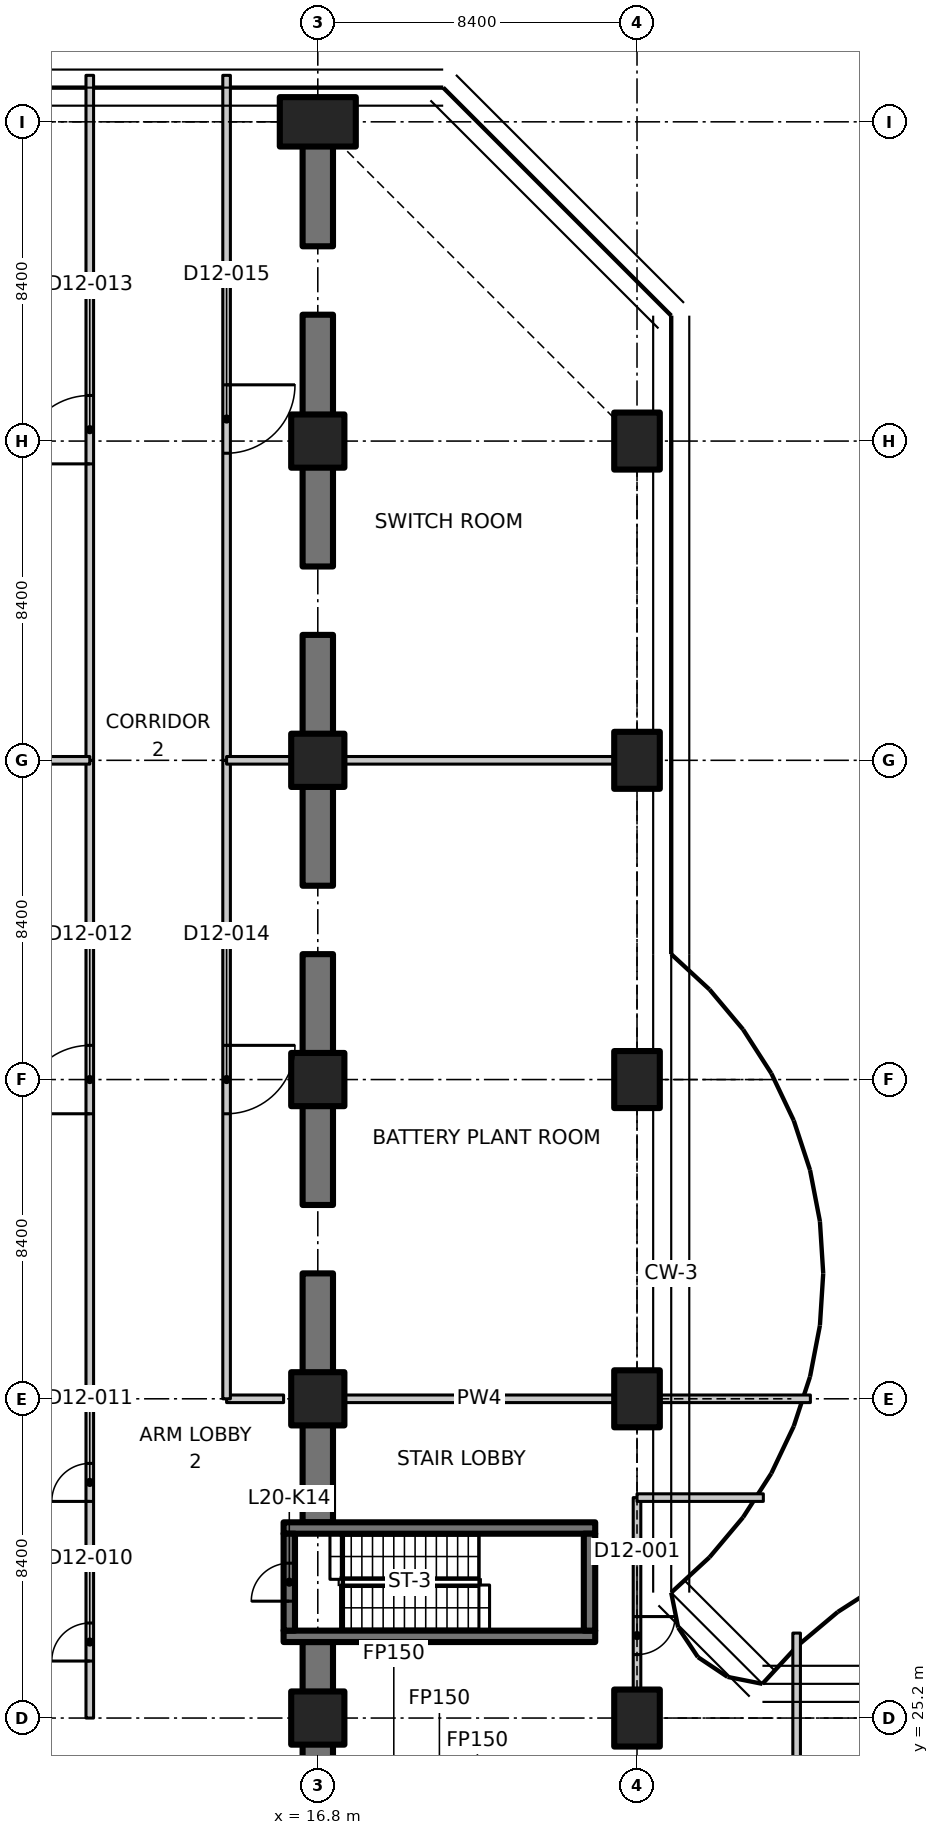
"""IFC4 building model, lengths in metres.
Left out: names, types, materials, properties, quantities, classifications, styles, units other than length and angle.
Written with IfcOpenShell. Run it as: python <this file> out.ifc"""

import sys

from ifc_helpers import new_model, si_unit, direction, frame, frame_2d, origin, origin_2d, place, context, subcontext, project, spatial, polyline, rectangle, outline, extrude, element, fill, save


model = new_model("IFC4")
c1 = context("Model", 3, precision=1e-05, world=origin(), true_north=direction((0.0, 1.0)))
c2 = subcontext(c1, "Body", "Model", "MODEL_VIEW")
j1 = project(units=[si_unit("LENGTHUNIT", "METRE"), si_unit("PLANEANGLEUNIT", "RADIAN")], contexts=[c1])
p1 = place(None, origin())
s1 = spatial("IfcSite", under=j1, at=p1, CompositionType="ELEMENT")
p2 = place(p1, origin())
s2 = spatial("IfcBuilding", under=s1, at=p2, CompositionType="ELEMENT")
p3 = place(p2, frame((0.0, 0.0, 86.9)))
s3 = spatial("IfcBuildingStorey", under=s2, at=p3, CompositionType="ELEMENT", Elevation=86.9)
for number, where, z_axis, x_axis in (
    (1, (16.8, 25.2, 0.0), (0.0, 0.0, 1.0), (1.0, 0.0, 0.0)),
    (2, (16.8, 33.6, 0.0), (0.0, 0.0, 1.0), (1.0, 0.0, 0.0)),
    (3, (16.8, 42.0, 0.0), (0.0, 0.0, 1.0), (1.0, 0.0, 0.0)),
    (4, (16.8, 50.4, 0.0), (0.0, 0.0, 1.0), (1.0, 0.0, 0.0)),
    (5, (16.8, 58.8, 0.0), (0.0, 0.0, 1.0), (1.0, 0.0, 0.0)),
):
    element("IfcColumn", number, at=place(p3, frame(where, z_axis=z_axis, x_axis=x_axis)), inside=s3, PredefinedType="COLUMN", context=c2, shape_type="SweptSolid", body=[
        extrude(rectangle(XDim=1.4, YDim=1.4, at=origin_2d()), origin(), (0.0, 0.0, 1.0), 4.55),
    ])
p4 = place(p3, frame((16.8, 67.2, 0.0), z_axis=(0.0, 0.0, 1.0), x_axis=(0.0, 1.0, 0.0)))
e6 = element("IfcColumn", 6, at=p4, inside=s3, PredefinedType="COLUMN", context=c2, shape_type="SweptSolid", body=[
    extrude(rectangle(XDim=1.3, YDim=2.0, at=origin_2d()), origin(), (0.0, 0.0, 1.0), 4.55),
])
for number, where, z_axis, x_axis in (
    (7, (25.2, 25.2, 0.0), (0.0, 0.0, 1.0), (1.0, 0.0, 0.0)),
    (8, (25.2, 33.6, 0.0), (0.0, 0.0, 1.0), (1.0, 0.0, 0.0)),
    (9, (25.2, 42.0, 0.0), (0.0, 0.0, 1.0), (1.0, 0.0, 0.0)),
    (10, (25.2, 50.4, 0.0), (0.0, 0.0, 1.0), (1.0, 0.0, 0.0)),
    (11, (25.2, 58.8, 0.0), (0.0, 0.0, 1.0), (1.0, 0.0, 0.0)),
):
    element("IfcColumn", number, at=place(p3, frame(where, z_axis=z_axis, x_axis=x_axis)), inside=s3, PredefinedType="COLUMN", context=c2, shape_type="SweptSolid", body=[
        extrude(rectangle(XDim=1.2, YDim=1.5, at=origin_2d()), origin(), (0.0, 0.0, 1.0), 4.55),
    ])
p5 = place(p3, frame((16.8, 21.565, 0.0), z_axis=(0.0, 0.0, 1.0), x_axis=(0.0, 1.0, 0.0)))
e12 = element("IfcWall", 12, at=p5, inside=s3, PredefinedType="SHEAR", context=c2, shape_type="SweptSolid", body=[
    extrude(rectangle(XDim=2.965, YDim=0.8, at=frame_2d((1.482, 0.0))), origin(), (0.0, 0.0, 1.0), 4.55),
])
p6 = place(p3, frame((16.8, 30.35, 0.0), z_axis=(0.0, 0.0, 1.0), x_axis=(0.0, 1.0, 0.0)))
e13 = element("IfcWall", 13, at=p6, inside=s3, PredefinedType="SHEAR", context=c2, shape_type="SweptSolid", body=[
    extrude(rectangle(XDim=2.58, YDim=0.8, at=frame_2d((1.29, 0.0))), origin(), (0.0, 0.0, 1.0), 4.55),
])
p7 = place(p3, frame((16.8, 25.87, 0.0), z_axis=(0.0, 0.0, 1.0), x_axis=(0.0, 1.0, 0.0)))
e14 = element("IfcWall", 14, at=p7, inside=s3, PredefinedType="SHEAR", context=c2, shape_type="SweptSolid", body=[
    extrude(rectangle(XDim=1.33, YDim=0.8, at=frame_2d((0.665, 0.0))), origin(), (0.0, 0.0, 1.0), 4.55),
])
p8 = place(p3, frame((16.8, 34.27, 0.0), z_axis=(0.0, 0.0, 1.0), x_axis=(0.0, 1.0, 0.0)))
e15 = element("IfcWall", 15, at=p8, inside=s3, PredefinedType="SHEAR", context=c2, shape_type="SweptSolid", body=[
    extrude(rectangle(XDim=2.63, YDim=0.8, at=frame_2d((1.315, 0.0))), origin(), (0.0, 0.0, 1.0), 4.55),
])
for number, where, z_axis, x_axis in (
    (16, (16.8, 38.7, 0.0), (0.0, 0.0, 1.0), (0.0, 1.0, 0.0)),
    (17, (16.8, 42.67, 0.0), (0.0, 0.0, 1.0), (0.0, 1.0, 0.0)),
):
    element("IfcWall", number, at=place(p3, frame(where, z_axis=z_axis, x_axis=x_axis)), inside=s3, PredefinedType="SHEAR", context=c2, shape_type="SweptSolid", body=[
        extrude(rectangle(XDim=2.63, YDim=0.8, at=frame_2d((1.315, 0.0))), origin(), (0.0, 0.0, 1.0), 4.55),
    ])
for number, where, z_axis, x_axis in (
    (18, (16.8, 47.1, 0.0), (0.0, 0.0, 1.0), (0.0, 1.0, 0.0)),
    (19, (16.8, 51.07, 0.0), (0.0, 0.0, 1.0), (0.0, 1.0, 0.0)),
    (20, (16.8, 55.5, 0.0), (0.0, 0.0, 1.0), (0.0, 1.0, 0.0)),
):
    element("IfcWall", number, at=place(p3, frame(where, z_axis=z_axis, x_axis=x_axis)), inside=s3, PredefinedType="SHEAR", context=c2, shape_type="SweptSolid", body=[
        extrude(rectangle(XDim=2.63, YDim=0.8, at=frame_2d((1.315, 0.0))), origin(), (0.0, 0.0, 1.0), 4.55),
    ])
for number, where, z_axis, x_axis in (
    (21, (16.8, 59.47, 0.0), (0.0, 0.0, 1.0), (0.0, 1.0, 0.0)),
    (22, (16.8, 63.925, 0.0), (0.0, 0.0, 1.0), (0.0, 1.0, 0.0)),
):
    element("IfcWall", number, at=place(p3, frame(where, z_axis=z_axis, x_axis=x_axis)), inside=s3, PredefinedType="SHEAR", context=c2, shape_type="SweptSolid", body=[
        extrude(rectangle(XDim=2.655, YDim=0.8, at=frame_2d((1.328, 0.0))), origin(), (0.0, 0.0, 1.0), 4.55),
    ])
for number, where, z_axis, x_axis in (
    (23, (15.9, 27.35, 0.0), (0.0, 0.0, 1.0), (1.0, 0.0, 0.0)),
    (24, (15.9, 30.2, 0.0), (0.0, 0.0, 1.0), (1.0, 0.0, 0.0)),
):
    element("IfcWall", number, at=place(p3, frame(where, z_axis=z_axis, x_axis=x_axis)), inside=s3, PredefinedType="SHEAR", context=c2, shape_type="SweptSolid", body=[
        extrude(rectangle(XDim=8.2, YDim=0.3, at=frame_2d((4.1, 0.0))), origin(), (0.0, 0.0, 1.0), 4.55),
    ])
p9 = place(p3, frame((16.05, 27.5, 0.0), z_axis=(0.0, 0.0, 1.0), x_axis=(0.0, 1.0, 0.0)))
e25 = element("IfcWall", 25, at=p9, inside=s3, PredefinedType="SHEAR", context=c2, shape_type="SweptSolid", body=[
    extrude(rectangle(XDim=2.55, YDim=0.3, at=frame_2d((1.275, 0.0))), origin(), (0.0, 0.0, 1.0), 4.55),
])
p10 = place(p9, frame((0.775, 0.0, 0.0)))
e26 = element("IfcOpeningElement", 26, at=p10, cuts=e25, PredefinedType="OPENING", context=c2, shape_type="SweptSolid", body=[
    extrude(rectangle(XDim=1.0, YDim=2.1, at=frame_2d((0.5, 1.05))), frame((0.0, 0.16, 0.0), z_axis=(0.0, -1.0, 0.0), x_axis=(1.0, 0.0, 0.0)), (0.0, 0.0, 1.0), 0.32),
])
p11 = place(p3, frame((23.95, 27.5, 0.0), z_axis=(0.0, 0.0, 1.0), x_axis=(0.0, 1.0, 0.0)))
e27 = element("IfcWall", 27, at=p11, inside=s3, PredefinedType="SHEAR", context=c2, shape_type="SweptSolid", body=[
    extrude(rectangle(XDim=2.55, YDim=0.3, at=frame_2d((1.275, 0.0))), origin(), (0.0, 0.0, 1.0), 4.55),
])
p12 = place(p3, frame((29.4, 27.436, 0.0), z_axis=(0.0, 0.0, 1.0), x_axis=(0.0, -1.0, 0.0)))
e28 = element("IfcWall", 28, at=p12, inside=s3, PredefinedType="PARTITIONING", context=c2, shape_type="SweptSolid", body=[
    extrude(outline(polyline([(0.0, 0.0), (6.236, 0.0), (6.236, 4.53), (2.686, 4.53), (2.684, 4.18), (1.788, 4.18), (1.786, 4.53), (0.161, 4.53), (0.0, 4.53), (0.0, 0.0)])), frame((0.0, 0.1, 0.0), z_axis=(0.0, -1.0, 0.0), x_axis=(1.0, 0.0, 0.0)), (0.0, 0.0, 1.0), 0.2),
])
p13 = place(p3, frame((25.2, 31.0, 0.0), z_axis=(0.0, 0.0, 1.0), x_axis=(0.0, -1.0, 0.0)))
e29 = element("IfcWall", 29, at=p13, inside=s3, PredefinedType="PARTITIONING", context=c2, shape_type="SweptSolid", body=[
    extrude(outline(polyline([(0.0, 0.0), (5.03, 0.0), (5.03, 4.18), (0.0, 4.18), (0.0, 0.0)])), frame((0.0, 0.1, 0.0), z_axis=(0.0, -1.0, 0.0), x_axis=(1.0, 0.0, 0.0)), (0.0, 0.0, 1.0), 0.2),
])
p14 = place(p13, frame((3.13, 0.0, 0.0)))
e30 = element("IfcOpeningElement", 30, at=p14, cuts=e29, PredefinedType="OPENING", context=c2, shape_type="SweptSolid", body=[
    extrude(rectangle(XDim=1.0, YDim=2.1, at=frame_2d((0.5, 1.05))), frame((0.0, 0.11, 0.0), z_axis=(0.0, -1.0, 0.0), x_axis=(1.0, 0.0, 0.0)), (0.0, 0.0, 1.0), 0.22),
])
p15 = place(p3, frame((25.2, 31.0, 0.0), z_axis=(0.0, 0.0, 1.0), x_axis=(1.0, 0.0, 0.0)))
e31 = element("IfcWall", 31, at=p15, inside=s3, PredefinedType="PARTITIONING", context=c2, shape_type="SweptSolid", body=[
    extrude(rectangle(XDim=3.324, YDim=0.2, at=frame_2d((1.662, 0.0))), origin(), (0.0, 0.0, 1.0), 4.18),
])
p16 = place(p3, frame((10.8, 25.2, 0.0), z_axis=(0.0, 0.0, 1.0), x_axis=(0.0, 1.0, 0.0)))
e32 = element("IfcWall", 32, at=p16, inside=s3, PredefinedType="PARTITIONING", context=c2, shape_type="SweptSolid", body=[
    extrude(rectangle(XDim=4.2, YDim=0.2, at=frame_2d((2.1, 0.0))), origin(), (0.0, 0.0, 1.0), 4.53),
])
p17 = place(p16, frame((1.5, 0.0, 0.0)))
e33 = element("IfcOpeningElement", 33, at=p17, cuts=e32, PredefinedType="OPENING", context=c2, shape_type="SweptSolid", body=[
    extrude(rectangle(XDim=1.0, YDim=2.1, at=frame_2d((0.5, 1.05))), frame((0.0, 0.11, 0.0), z_axis=(0.0, -1.0, 0.0), x_axis=(1.0, 0.0, 0.0)), (0.0, 0.0, 1.0), 0.22),
])
p18 = place(p3, frame((10.8, 29.4, 0.0), z_axis=(0.0, 0.0, 1.0), x_axis=(0.0, 1.0, 0.0)))
e34 = element("IfcWall", 34, at=p18, inside=s3, PredefinedType="PARTITIONING", context=c2, shape_type="SweptSolid", body=[
    extrude(rectangle(XDim=4.2, YDim=0.2, at=frame_2d((2.1, 0.0))), origin(), (0.0, 0.0, 1.0), 4.53),
])
p19 = place(p18, frame((1.5, 0.0, 0.0)))
e35 = element("IfcOpeningElement", 35, at=p19, cuts=e34, PredefinedType="OPENING", context=c2, shape_type="SweptSolid", body=[
    extrude(rectangle(XDim=1.0, YDim=2.1, at=frame_2d((0.5, 1.05))), frame((0.0, 0.11, 0.0), z_axis=(0.0, -1.0, 0.0), x_axis=(1.0, 0.0, 0.0)), (0.0, 0.0, 1.0), 0.22),
])
p20 = place(p3, frame((14.4, 33.6, 0.0), z_axis=(0.0, 0.0, 1.0), x_axis=(1.0, 0.0, 0.0)))
e36 = element("IfcWall", 36, at=p20, inside=s3, PredefinedType="PARTITIONING", context=c2, shape_type="SweptSolid", body=[
    extrude(rectangle(XDim=1.5, YDim=0.2, at=frame_2d((0.75, 0.0))), origin(), (0.0, 0.0, 1.0), 4.53),
])
p21 = place(p3, frame((17.52, 33.6, 0.0), z_axis=(0.0, 0.0, 1.0), x_axis=(1.0, 0.0, 0.0)))
e37 = element("IfcWall", 37, at=p21, inside=s3, PredefinedType="PARTITIONING", context=c2, shape_type="SweptSolid", body=[
    extrude(rectangle(XDim=7.06, YDim=0.2, at=frame_2d((3.53, 0.0))), origin(), (0.0, 0.0, 1.0), 4.53),
])
p22 = place(p3, frame((25.82, 33.6, 0.0), z_axis=(0.0, 0.0, 1.0), x_axis=(1.0, 0.0, 0.0)))
e38 = element("IfcWall", 38, at=p22, inside=s3, PredefinedType="PARTITIONING", context=c2, shape_type="SweptSolid", body=[
    extrude(rectangle(XDim=3.942, YDim=0.2, at=frame_2d((1.971, 0.0))), origin(), (0.0, 0.0, 1.0), 4.18),
])
p23 = place(p3, frame((10.8, 33.6, 0.0), z_axis=(0.0, 0.0, 1.0), x_axis=(0.0, 1.0, 0.0)))
e39 = element("IfcWall", 39, at=p23, inside=s3, PredefinedType="PARTITIONING", context=c2, shape_type="SweptSolid", body=[
    extrude(rectangle(XDim=16.8, YDim=0.2, at=frame_2d((8.4, 0.0))), origin(), (0.0, 0.0, 1.0), 4.53),
])
p24 = place(p23, frame((7.5, 0.0, 0.0)))
e40 = element("IfcOpeningElement", 40, at=p24, cuts=e39, PredefinedType="OPENING", context=c2, shape_type="SweptSolid", body=[
    extrude(rectangle(XDim=1.8, YDim=2.1, at=frame_2d((0.9, 1.05))), frame((0.0, 0.11, 0.0), z_axis=(0.0, -1.0, 0.0), x_axis=(1.0, 0.0, 0.0)), (0.0, 0.0, 1.0), 0.22),
])
p25 = place(p3, frame((10.8, 50.4, 0.0), z_axis=(0.0, 0.0, 1.0), x_axis=(0.0, 1.0, 0.0)))
e41 = element("IfcWall", 41, at=p25, inside=s3, PredefinedType="PARTITIONING", context=c2, shape_type="SweptSolid", body=[
    extrude(outline(polyline([(0.0, 0.0), (18.023, 0.0), (18.023, 4.53), (17.88, 4.53), (17.25, 4.53), (17.248, 4.18), (16.352, 4.18), (16.35, 4.53), (0.0, 4.53), (0.0, 0.0)])), frame((0.0, 0.1, 0.0), z_axis=(0.0, -1.0, 0.0), x_axis=(1.0, 0.0, 0.0)), (0.0, 0.0, 1.0), 0.2),
])
p26 = place(p25, frame((7.8, 0.0, 0.0)))
e42 = element("IfcOpeningElement", 42, at=p26, cuts=e41, PredefinedType="OPENING", context=c2, shape_type="SweptSolid", body=[
    extrude(rectangle(XDim=1.8, YDim=2.1, at=frame_2d((0.9, 1.05))), frame((0.0, 0.11, 0.0), z_axis=(0.0, -1.0, 0.0), x_axis=(1.0, 0.0, 0.0)), (0.0, 0.0, 1.0), 0.22),
])
p27 = place(p3, frame((14.4, 50.4, 0.0), z_axis=(0.0, 0.0, 1.0), x_axis=(0.0, -1.0, 0.0)))
e43 = element("IfcWall", 43, at=p27, inside=s3, PredefinedType="PARTITIONING", context=c2, shape_type="SweptSolid", body=[
    extrude(rectangle(XDim=16.8, YDim=0.2, at=frame_2d((8.4, 0.0))), origin(), (0.0, 0.0, 1.0), 4.53),
])
p28 = place(p27, frame((7.5, 0.0, 0.0)))
e44 = element("IfcOpeningElement", 44, at=p28, cuts=e43, PredefinedType="OPENING", context=c2, shape_type="SweptSolid", body=[
    extrude(rectangle(XDim=1.8, YDim=2.1, at=frame_2d((0.9, 1.05))), frame((0.0, 0.11, 0.0), z_axis=(0.0, -1.0, 0.0), x_axis=(1.0, 0.0, 0.0)), (0.0, 0.0, 1.0), 0.22),
])
p29 = place(p3, frame((14.4, 68.423, 0.0), z_axis=(0.0, 0.0, 1.0), x_axis=(0.0, -1.0, 0.0)))
e45 = element("IfcWall", 45, at=p29, inside=s3, PredefinedType="PARTITIONING", context=c2, shape_type="SweptSolid", body=[
    extrude(outline(polyline([(0.0, 0.0), (18.023, 0.0), (18.023, 4.53), (1.673, 4.53), (1.671, 4.18), (0.775, 4.18), (0.773, 4.53), (0.143, 4.53), (0.0, 4.53), (0.0, 0.0)])), frame((0.0, 0.1, 0.0), z_axis=(0.0, -1.0, 0.0), x_axis=(1.0, 0.0, 0.0)), (0.0, 0.0, 1.0), 0.2),
])
p30 = place(p29, frame((8.143, 0.0, 0.0)))
e46 = element("IfcOpeningElement", 46, at=p30, cuts=e45, PredefinedType="OPENING", context=c2, shape_type="SweptSolid", body=[
    extrude(rectangle(XDim=1.8, YDim=2.1, at=frame_2d((0.9, 1.05))), frame((0.0, 0.11, 0.0), z_axis=(0.0, -1.0, 0.0), x_axis=(1.0, 0.0, 0.0)), (0.0, 0.0, 1.0), 0.22),
])
p31 = place(p3, frame((-1.176, 29.4, 0.0), z_axis=(0.0, 0.0, 1.0), x_axis=(1.0, 0.0, 0.0)))
e47 = element("IfcWall", 47, at=p31, inside=s3, PredefinedType="PARTITIONING", context=c2, shape_type="SweptSolid", body=[
    extrude(outline(polyline([(0.0, 0.0), (11.976, 0.0), (11.976, 4.53), (1.625, 4.53), (1.624, 4.18), (0.728, 4.18), (0.726, 4.53), (0.075, 4.53), (0.0, 4.53), (0.0, 0.0)])), frame((0.0, 0.1, 0.0), z_axis=(0.0, -1.0, 0.0), x_axis=(1.0, 0.0, 0.0)), (0.0, 0.0, 1.0), 0.2),
])
for number, where, z_axis, x_axis in (
    (48, (9.12, 33.6, 0.0), (0.0, 0.0, 1.0), (1.0, 0.0, 0.0)),
    (49, (9.12, 50.4, 0.0), (0.0, 0.0, 1.0), (1.0, 0.0, 0.0)),
):
    element("IfcWall", number, at=place(p3, frame(where, z_axis=z_axis, x_axis=x_axis)), inside=s3, PredefinedType="PARTITIONING", context=c2, shape_type="SweptSolid", body=[
        extrude(rectangle(XDim=1.68, YDim=0.2, at=frame_2d((0.84, 0.0))), origin(), (0.0, 0.0, 1.0), 4.53),
    ])
p32 = place(p3, frame((14.4, 50.4, 0.0), z_axis=(0.0, 0.0, 1.0), x_axis=(1.0, 0.0, 0.0)))
e50 = element("IfcWall", 50, at=p32, inside=s3, PredefinedType="PARTITIONING", context=c2, shape_type="SweptSolid", body=[
    extrude(rectangle(XDim=1.68, YDim=0.2, at=frame_2d((0.84, 0.0))), origin(), (0.0, 0.0, 1.0), 4.53),
])
p33 = place(p3, frame((17.52, 50.4, 0.0), z_axis=(0.0, 0.0, 1.0), x_axis=(1.0, 0.0, 0.0)))
e51 = element("IfcWall", 51, at=p33, inside=s3, PredefinedType="PARTITIONING", context=c2, shape_type="SweptSolid", body=[
    extrude(rectangle(XDim=7.06, YDim=0.2, at=frame_2d((3.53, 0.0))), origin(), (0.0, 0.0, 1.0), 4.53),
])
p34 = place(p10, origin())
e52 = element("IfcDoor", 52, at=p34, inside=s3, OperationType="SINGLE_SWING_RIGHT", PredefinedType="DOOR", context=c2, shape_type="SweptSolid", body=[
    extrude(rectangle(XDim=1.0, YDim=2.1, at=frame_2d((0.5, 1.05))), frame((0.0, 0.025, 0.0), z_axis=(0.0, -1.0, 0.0), x_axis=(1.0, 0.0, 0.0)), (0.0, 0.0, 1.0), 0.05),
])
fill(e26, e52)
p35 = place(p14, origin())
e53 = element("IfcDoor", 53, at=p35, inside=s3, OperationType="SINGLE_SWING_RIGHT", PredefinedType="DOOR", context=c2, shape_type="SweptSolid", body=[
    extrude(rectangle(XDim=1.0, YDim=2.1, at=frame_2d((0.5, 1.05))), frame((0.0, 0.025, 0.0), z_axis=(0.0, -1.0, 0.0), x_axis=(1.0, 0.0, 0.0)), (0.0, 0.0, 1.0), 0.05),
])
fill(e30, e53)
p36 = place(p17, origin())
e54 = element("IfcDoor", 54, at=p36, inside=s3, OperationType="SINGLE_SWING_LEFT", PredefinedType="DOOR", context=c2, shape_type="SweptSolid", body=[
    extrude(rectangle(XDim=1.0, YDim=2.1, at=frame_2d((0.5, 1.05))), frame((0.0, 0.025, 0.0), z_axis=(0.0, -1.0, 0.0), x_axis=(1.0, 0.0, 0.0)), (0.0, 0.0, 1.0), 0.05),
])
fill(e33, e54)
p37 = place(p19, origin())
e55 = element("IfcDoor", 55, at=p37, inside=s3, OperationType="SINGLE_SWING_LEFT", PredefinedType="DOOR", context=c2, shape_type="SweptSolid", body=[
    extrude(rectangle(XDim=1.0, YDim=2.1, at=frame_2d((0.5, 1.05))), frame((0.0, 0.025, 0.0), z_axis=(0.0, -1.0, 0.0), x_axis=(1.0, 0.0, 0.0)), (0.0, 0.0, 1.0), 0.05),
])
fill(e35, e55)
p38 = place(p24, origin())
e56 = element("IfcDoor", 56, at=p38, inside=s3, OperationType="DOUBLE_DOOR_SINGLE_SWING", PredefinedType="DOOR", context=c2, shape_type="SweptSolid", body=[
    extrude(rectangle(XDim=1.8, YDim=2.1, at=frame_2d((0.9, 1.05))), frame((0.0, 0.025, 0.0), z_axis=(0.0, -1.0, 0.0), x_axis=(1.0, 0.0, 0.0)), (0.0, 0.0, 1.0), 0.05),
])
fill(e40, e56)
p39 = place(p26, origin())
e57 = element("IfcDoor", 57, at=p39, inside=s3, OperationType="DOUBLE_DOOR_SINGLE_SWING", PredefinedType="DOOR", context=c2, shape_type="SweptSolid", body=[
    extrude(rectangle(XDim=1.8, YDim=2.1, at=frame_2d((0.9, 1.05))), frame((0.0, 0.025, 0.0), z_axis=(0.0, -1.0, 0.0), x_axis=(1.0, 0.0, 0.0)), (0.0, 0.0, 1.0), 0.05),
])
fill(e42, e57)
p40 = place(p28, origin())
e58 = element("IfcDoor", 58, at=p40, inside=s3, OperationType="DOUBLE_DOOR_SINGLE_SWING", PredefinedType="DOOR", context=c2, shape_type="SweptSolid", body=[
    extrude(rectangle(XDim=1.8, YDim=2.1, at=frame_2d((0.9, 1.05))), frame((0.0, 0.025, 0.0), z_axis=(0.0, -1.0, 0.0), x_axis=(1.0, 0.0, 0.0)), (0.0, 0.0, 1.0), 0.05),
])
fill(e44, e58)
p41 = place(p30, origin())
e59 = element("IfcDoor", 59, at=p41, inside=s3, OperationType="DOUBLE_DOOR_SINGLE_SWING", PredefinedType="DOOR", context=c2, shape_type="SweptSolid", body=[
    extrude(rectangle(XDim=1.8, YDim=2.1, at=frame_2d((0.9, 1.05))), frame((0.0, 0.025, 0.0), z_axis=(0.0, -1.0, 0.0), x_axis=(1.0, 0.0, 0.0)), (0.0, 0.0, 1.0), 0.05),
])
fill(e46, e59)
save(model, sys.argv[1])
